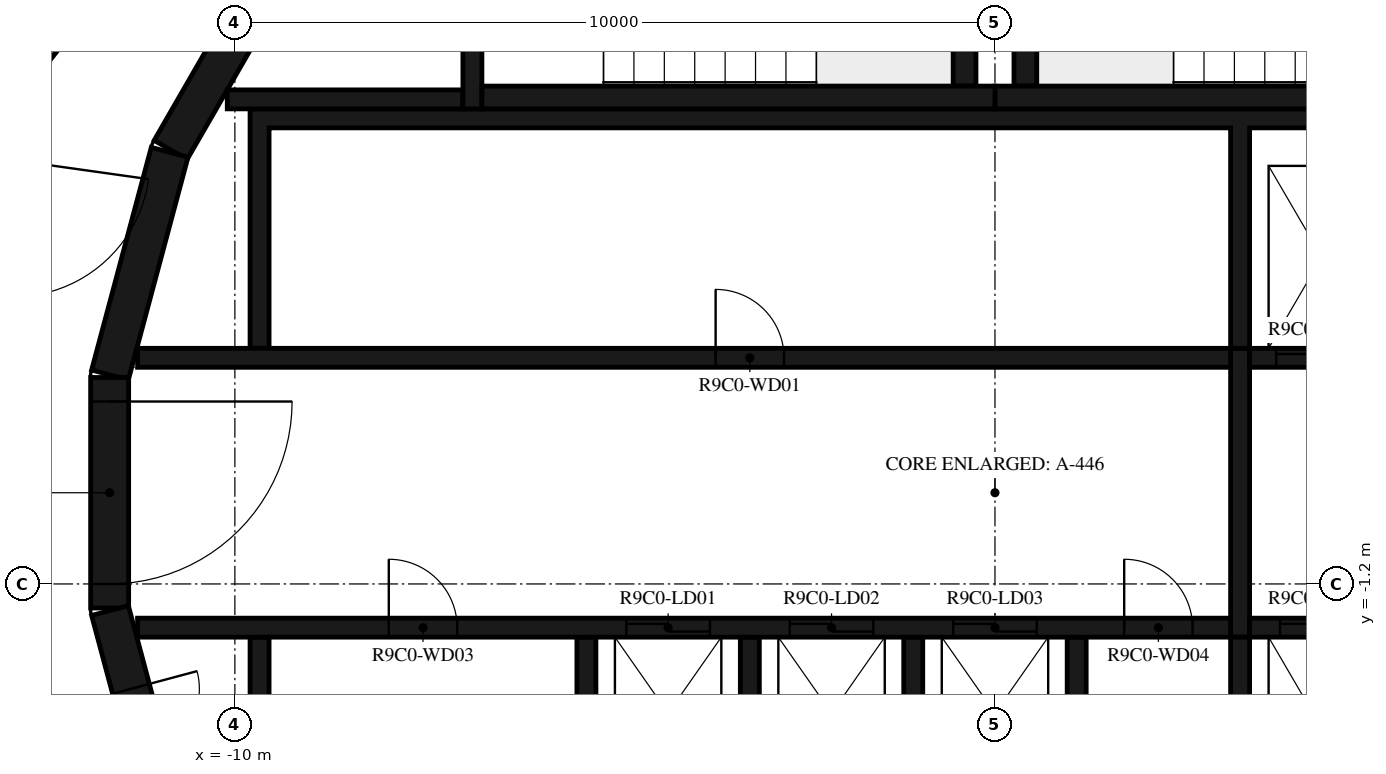
"""IFC4 building model, lengths in metres.
Left out: names, types, materials, properties, quantities, classifications, styles, units other than length and angle.
Written with IfcOpenShell. Run it as: python <this file> out.ifc"""

import sys

from ifc_helpers import new_model, si_unit, direction, frame, frame_2d, origin, place, context, subcontext, project, spatial, polyline, rectangle, outline, extrude, element, fill, save


model = new_model("IFC4")
c1 = context("Model", 3, precision=1e-05, world=origin(), true_north=direction((0.0, 1.0)))
c2 = subcontext(c1, "Body", "Model", "MODEL_VIEW")
j1 = project(units=[si_unit("LENGTHUNIT", "METRE"), si_unit("PLANEANGLEUNIT", "RADIAN")], contexts=[c1])
p1 = place(None, origin())
s1 = spatial("IfcSite", under=j1, at=p1, CompositionType="ELEMENT")
p2 = place(p1, origin())
s2 = spatial("IfcBuilding", under=s1, at=p2, CompositionType="ELEMENT")
p3 = place(p2, frame((0.0, 0.0, 354.0)))
s3 = spatial("IfcBuildingStorey", under=s2, at=p3, CompositionType="ELEMENT", Elevation=354.0)
for number, where, z_axis, x_axis in (
    (1, (-9.329, 7.137, 0.0), (0.0, 0.0, 1.0), (-0.5, -0.866, 0.0)),
    (2, (-10.858, 4.479, 0.0), (0.0, 0.0, 1.0), (-0.259, -0.966, 0.0)),
):
    element("IfcWall", number, at=place(p3, frame(where, z_axis=z_axis, x_axis=x_axis)), inside=s3, PredefinedType="SHEAR", context=c2, shape_type="SweptSolid", body=[
        extrude(rectangle(XDim=3.033, YDim=0.5, at=frame_2d((1.516, 0.0))), origin(), (0.0, 0.0, 1.0), 3.12),
    ])
p4 = place(p3, frame((-11.647, 1.516, 0.0), z_axis=(0.0, 0.0, 1.0), x_axis=(0.0, -1.0, 0.0)))
e3 = element("IfcWall", 3, at=p4, inside=s3, PredefinedType="SHEAR", context=c2, shape_type="SweptSolid", body=[
    extrude(rectangle(XDim=3.033, YDim=0.5, at=frame_2d((1.516, 0.0))), origin(), (0.0, 0.0, 1.0), 3.12),
])
p5 = place(p4, frame((0.316, 0.0, 0.0)))
e4 = element("IfcOpeningElement", 4, at=p5, cuts=e3, PredefinedType="OPENING", context=c2, shape_type="SweptSolid", body=[
    extrude(rectangle(XDim=2.4, YDim=2.1, at=frame_2d((1.2, 1.05))), frame((0.0, 0.26, 0.0), z_axis=(0.0, -1.0, 0.0), x_axis=(1.0, 0.0, 0.0)), (0.0, 0.0, 1.0), 0.52),
])
p6 = place(p3, frame((-11.643, -1.55, 0.0), z_axis=(0.0, 0.0, 1.0), x_axis=(0.258734743916, -0.965948410781, 0.0)))
e5 = element("IfcWall", 5, at=p6, inside=s3, PredefinedType="SHEAR", context=c2, shape_type="SweptSolid", body=[
    extrude(rectangle(XDim=3.033, YDim=0.5, at=frame_2d((1.516, 0.0))), origin(), (0.0, 0.0, 1.0), 3.12),
])
p7 = place(p6, frame((1.066, 0.0, 0.0)))
e6 = element("IfcOpeningElement", 6, at=p7, cuts=e5, PredefinedType="OPENING", context=c2, shape_type="SweptSolid", body=[
    extrude(rectangle(XDim=0.9, YDim=2.1, at=frame_2d((0.45, 1.05))), frame((0.0, 0.26, 0.0), z_axis=(0.0, -1.0, 0.0), x_axis=(1.0, 0.0, 0.0)), (0.0, 0.0, 1.0), 0.52),
])
p8 = place(p3, frame((0.0, 5.2, 0.0), z_axis=(0.0, 0.0, 1.0), x_axis=(1.0, 0.0, 0.0)))
e7 = element("IfcWall", 7, at=p8, inside=s3, PredefinedType="SHEAR", context=c2, shape_type="SweptSolid", body=[
    extrude(rectangle(XDim=6.75, YDim=0.3, at=frame_2d((3.375, 0.0))), origin(), (0.0, 0.0, 1.0), 3.12),
])
p9 = place(p3, frame((0.4, 5.35, 0.0), z_axis=(0.0, 0.0, 1.0), x_axis=(0.0, 1.0, 0.0)))
e8 = element("IfcWall", 8, at=p9, inside=s3, PredefinedType="SHEAR", context=c2, shape_type="SweptSolid", body=[
    extrude(rectangle(XDim=3.32, YDim=0.3, at=frame_2d((1.66, 0.0))), origin(), (0.0, 0.0, 1.0), 3.12),
])
p10 = place(p3, frame((-6.75, 5.2, 0.0), z_axis=(0.0, 0.0, 1.0), x_axis=(1.0, 0.0, 0.0)))
e9 = element("IfcWall", 9, at=p10, inside=s3, PredefinedType="SHEAR", context=c2, shape_type="SweptSolid", body=[
    extrude(rectangle(XDim=6.75, YDim=0.3, at=frame_2d((3.375, 0.0))), origin(), (0.0, 0.0, 1.0), 3.12),
])
p11 = place(p3, frame((-0.4, 5.35, 0.0), z_axis=(0.0, 0.0, 1.0), x_axis=(0.0, 1.0, 0.0)))
e10 = element("IfcWall", 10, at=p11, inside=s3, PredefinedType="SHEAR", context=c2, shape_type="SweptSolid", body=[
    extrude(rectangle(XDim=3.32, YDim=0.3, at=frame_2d((1.66, 0.0))), origin(), (0.0, 0.0, 1.0), 3.12),
])
p12 = place(p3, frame((-6.875, 8.97, 0.0), z_axis=(0.0, 0.0, 1.0), x_axis=(0.0, -1.0, 0.0)))
e11 = element("IfcWall", 11, at=p12, inside=s3, PredefinedType="SHEAR", context=c2, shape_type="SweptSolid", body=[
    extrude(rectangle(XDim=3.92, YDim=0.25, at=frame_2d((1.96, 0.0))), origin(), (0.0, 0.0, 1.0), 3.12),
])
p13 = place(p12, frame((1.61, 0.0, 0.0)))
e12 = element("IfcOpeningElement", 12, at=p13, cuts=e11, PredefinedType="OPENING", context=c2, shape_type="SweptSolid", body=[
    extrude(rectangle(XDim=1.2, YDim=2.1, at=frame_2d((0.6, 1.05))), frame((0.0, 0.135, 0.0), z_axis=(0.0, -1.0, 0.0), x_axis=(1.0, 0.0, 0.0)), (0.0, 0.0, 1.0), 0.27),
])
p14 = place(p3, frame((-7.0, 5.175, 0.0), z_axis=(0.0, 0.0, 1.0), x_axis=(-1.0, 0.0, 0.0)))
e13 = element("IfcWall", 13, at=p14, inside=s3, PredefinedType="SHEAR", context=c2, shape_type="SweptSolid", body=[
    extrude(rectangle(XDim=3.1, YDim=0.25, at=frame_2d((1.55, 0.0))), origin(), (0.0, 0.0, 1.0), 3.12),
])
p15 = place(p3, origin())
e14 = element("IfcWall", 14, at=p15, inside=s3, PredefinedType="SHEAR", context=c2, shape_type="SweptSolid", body=[
    extrude(outline(polyline([(-9.8, 1.9), (-9.55, 1.9), (-9.55, 4.8), (3.1, 4.8), (3.1, 1.9), (3.35, 1.9), (3.35, 4.8), (5.25, 4.8), (5.25, 1.9), (5.5, 1.9), (5.5, 4.8), (7.4, 4.8), (7.4, 1.9), (7.65, 1.9), (7.65, 4.8), (9.55, 4.8), (9.55, 1.9), (9.8, 1.9), (9.8, 4.8), (9.8, 5.05), (-9.8, 5.05), (-9.8, 4.8), (-9.8, 1.9)])), origin(), (0.0, 0.0, 1.0), 3.12),
])
p16 = place(p3, origin())
e15 = element("IfcWall", 15, at=p16, inside=s3, PredefinedType="SHEAR", context=c2, shape_type="SweptSolid", body=[
    extrude(outline(polyline([(9.8, -5.05), (9.8, -4.8), (9.8, -1.9), (9.55, -1.9), (9.55, -4.8), (7.65, -4.8), (7.65, -1.9), (7.4, -1.9), (7.4, -4.8), (5.5, -4.8), (5.5, -1.9), (5.25, -1.9), (5.25, -4.8), (3.35, -4.8), (3.35, -1.9), (3.1, -1.9), (3.1, -4.8), (1.2, -4.8), (1.2, -1.9), (0.95, -1.9), (0.95, -4.8), (-0.95, -4.8), (-0.95, -1.9), (-1.2, -1.9), (-1.2, -4.8), (-3.1, -4.8), (-3.1, -1.9), (-3.35, -1.9), (-3.35, -4.8), (-5.25, -4.8), (-5.25, -1.9), (-5.5, -1.9), (-5.5, -4.8), (-9.55, -4.8), (-9.55, -1.9), (-9.8, -1.9), (-9.8, -4.8), (-9.8, -5.05), (9.8, -5.05)])), origin(), (0.0, 0.0, 1.0), 3.12),
])
p17 = place(p3, frame((-11.28, 1.775, 0.0), z_axis=(0.0, 0.0, 1.0), x_axis=(1.0, 0.0, 0.0)))
e16 = element("IfcWall", 16, at=p17, inside=s3, PredefinedType="SHEAR", context=c2, shape_type="SweptSolid", body=[
    extrude(rectangle(XDim=14.38, YDim=0.25, at=frame_2d((7.19, 0.0))), origin(), (0.0, 0.0, 1.0), 3.12),
])
p18 = place(p17, frame((7.605, 0.0, 0.0)))
e17 = element("IfcOpeningElement", 17, at=p18, cuts=e16, PredefinedType="OPENING", context=c2, shape_type="SweptSolid", body=[
    extrude(rectangle(XDim=0.9, YDim=2.1, at=frame_2d((0.45, 1.05))), frame((0.0, 0.135, 0.0), z_axis=(0.0, -1.0, 0.0), x_axis=(1.0, 0.0, 0.0)), (0.0, 0.0, 1.0), 0.27),
])
p19 = place(p3, frame((3.35, 1.775, 0.0), z_axis=(0.0, 0.0, 1.0), x_axis=(1.0, 0.0, 0.0)))
e18 = element("IfcWall", 18, at=p19, inside=s3, PredefinedType="SHEAR", context=c2, shape_type="SweptSolid", body=[
    extrude(rectangle(XDim=7.93, YDim=0.25, at=frame_2d((3.965, 0.0))), origin(), (0.0, 0.0, 1.0), 3.12),
])
p20 = place(p19, frame((0.35, 0.0, 0.0)))
e19 = element("IfcOpeningElement", 19, at=p20, cuts=e18, PredefinedType="OPENING", context=c2, shape_type="SweptSolid", body=[
    extrude(rectangle(XDim=1.2, YDim=2.4, at=frame_2d((0.6, 1.2))), frame((0.0, 0.135, 0.0), z_axis=(0.0, -1.0, 0.0), x_axis=(1.0, 0.0, 0.0)), (0.0, 0.0, 1.0), 0.27),
])
p21 = place(p19, frame((2.5, 0.0, 0.0)))
e20 = element("IfcOpeningElement", 20, at=p21, cuts=e18, PredefinedType="OPENING", context=c2, shape_type="SweptSolid", body=[
    extrude(rectangle(XDim=1.2, YDim=2.4, at=frame_2d((0.6, 1.2))), frame((0.0, 0.135, 0.0), z_axis=(0.0, -1.0, 0.0), x_axis=(1.0, 0.0, 0.0)), (0.0, 0.0, 1.0), 0.27),
])
p22 = place(p19, frame((4.8, 0.0, 0.0)))
e21 = element("IfcOpeningElement", 21, at=p22, cuts=e18, PredefinedType="OPENING", context=c2, shape_type="SweptSolid", body=[
    extrude(rectangle(XDim=0.9, YDim=2.1, at=frame_2d((0.45, 1.05))), frame((0.0, 0.135, 0.0), z_axis=(0.0, -1.0, 0.0), x_axis=(1.0, 0.0, 0.0)), (0.0, 0.0, 1.0), 0.27),
])
p23 = place(p3, frame((-11.28, -1.775, 0.0), z_axis=(0.0, 0.0, 1.0), x_axis=(1.0, 0.0, 0.0)))
e22 = element("IfcWall", 22, at=p23, inside=s3, PredefinedType="SHEAR", context=c2, shape_type="SweptSolid", body=[
    extrude(rectangle(XDim=14.38, YDim=0.25, at=frame_2d((7.19, 0.0))), origin(), (0.0, 0.0, 1.0), 3.12),
])
p24 = place(p23, frame((6.43, 0.0, 0.0)))
e23 = element("IfcOpeningElement", 23, at=p24, cuts=e22, PredefinedType="OPENING", context=c2, shape_type="SweptSolid", body=[
    extrude(rectangle(XDim=1.1, YDim=2.1, at=frame_2d((0.55, 1.05))), frame((0.0, 0.135, 0.0), z_axis=(0.0, -1.0, 0.0), x_axis=(1.0, 0.0, 0.0)), (0.0, 0.0, 1.0), 0.27),
])
p25 = place(p23, frame((8.58, 0.0, 0.0)))
e24 = element("IfcOpeningElement", 24, at=p25, cuts=e22, PredefinedType="OPENING", context=c2, shape_type="SweptSolid", body=[
    extrude(rectangle(XDim=1.1, YDim=2.1, at=frame_2d((0.55, 1.05))), frame((0.0, 0.135, 0.0), z_axis=(0.0, -1.0, 0.0), x_axis=(1.0, 0.0, 0.0)), (0.0, 0.0, 1.0), 0.27),
])
p26 = place(p23, frame((10.73, 0.0, 0.0)))
e25 = element("IfcOpeningElement", 25, at=p26, cuts=e22, PredefinedType="OPENING", context=c2, shape_type="SweptSolid", body=[
    extrude(rectangle(XDim=1.1, YDim=2.1, at=frame_2d((0.55, 1.05))), frame((0.0, 0.135, 0.0), z_axis=(0.0, -1.0, 0.0), x_axis=(1.0, 0.0, 0.0)), (0.0, 0.0, 1.0), 0.27),
])
p27 = place(p23, frame((3.305, 0.0, 0.0)))
e26 = element("IfcOpeningElement", 26, at=p27, cuts=e22, PredefinedType="OPENING", context=c2, shape_type="SweptSolid", body=[
    extrude(rectangle(XDim=0.9, YDim=2.1, at=frame_2d((0.45, 1.05))), frame((0.0, 0.135, 0.0), z_axis=(0.0, -1.0, 0.0), x_axis=(1.0, 0.0, 0.0)), (0.0, 0.0, 1.0), 0.27),
])
p28 = place(p23, frame((12.98, 0.0, 0.0)))
e27 = element("IfcOpeningElement", 27, at=p28, cuts=e22, PredefinedType="OPENING", context=c2, shape_type="SweptSolid", body=[
    extrude(rectangle(XDim=0.9, YDim=2.1, at=frame_2d((0.45, 1.05))), frame((0.0, 0.135, 0.0), z_axis=(0.0, -1.0, 0.0), x_axis=(1.0, 0.0, 0.0)), (0.0, 0.0, 1.0), 0.27),
])
p29 = place(p3, frame((3.35, -1.775, 0.0), z_axis=(0.0, 0.0, 1.0), x_axis=(1.0, 0.0, 0.0)))
e28 = element("IfcWall", 28, at=p29, inside=s3, PredefinedType="SHEAR", context=c2, shape_type="SweptSolid", body=[
    extrude(rectangle(XDim=7.93, YDim=0.25, at=frame_2d((3.965, 0.0))), origin(), (0.0, 0.0, 1.0), 3.12),
])
p30 = place(p29, frame((0.4, 0.0, 0.0)))
e29 = element("IfcOpeningElement", 29, at=p30, cuts=e28, PredefinedType="OPENING", context=c2, shape_type="SweptSolid", body=[
    extrude(rectangle(XDim=1.1, YDim=2.4, at=frame_2d((0.55, 1.2))), frame((0.0, 0.135, 0.0), z_axis=(0.0, -1.0, 0.0), x_axis=(1.0, 0.0, 0.0)), (0.0, 0.0, 1.0), 0.27),
])
p31 = place(p29, frame((2.55, 0.0, 0.0)))
e30 = element("IfcOpeningElement", 30, at=p31, cuts=e28, PredefinedType="OPENING", context=c2, shape_type="SweptSolid", body=[
    extrude(rectangle(XDim=1.1, YDim=2.4, at=frame_2d((0.55, 1.2))), frame((0.0, 0.135, 0.0), z_axis=(0.0, -1.0, 0.0), x_axis=(1.0, 0.0, 0.0)), (0.0, 0.0, 1.0), 0.27),
])
p32 = place(p29, frame((4.7, 0.0, 0.0)))
e31 = element("IfcOpeningElement", 31, at=p32, cuts=e28, PredefinedType="OPENING", context=c2, shape_type="SweptSolid", body=[
    extrude(rectangle(XDim=1.1, YDim=2.4, at=frame_2d((0.55, 1.2))), frame((0.0, 0.135, 0.0), z_axis=(0.0, -1.0, 0.0), x_axis=(1.0, 0.0, 0.0)), (0.0, 0.0, 1.0), 0.27),
])
p33 = place(p3, frame((3.225, -1.9, 0.0), z_axis=(0.0, 0.0, 1.0), x_axis=(0.0, 1.0, 0.0)))
e32 = element("IfcWall", 32, at=p33, inside=s3, PredefinedType="SHEAR", context=c2, shape_type="SweptSolid", body=[
    extrude(rectangle(XDim=3.8, YDim=0.25, at=frame_2d((1.9, 0.0))), origin(), (0.0, 0.0, 1.0), 3.12),
])
p34 = place(p3, frame((-13.769, -1.691, 0.0), z_axis=(0.0, 0.0, 1.0), x_axis=(0.372720094028, -0.927943819155, 0.0)))
e33 = element("IfcWall", 33, at=p34, inside=s3, PredefinedType="STANDARD", context=c2, shape_type="SweptSolid", body=[
    extrude(rectangle(XDim=4.875, YDim=0.2, at=frame_2d((2.438, 0.0))), origin(), (0.0, 0.0, 1.0), 3.12),
])
p35 = place(p3, frame((-8.349, 11.079, 0.0), z_axis=(0.0, 0.0, 1.0), x_axis=(-0.615669112324, -0.78800478687, 0.0)))
e34 = element("IfcWall", 34, at=p35, inside=s3, PredefinedType="STANDARD", context=c2, shape_type="SweptSolid", body=[
    extrude(rectangle(XDim=7.181, YDim=0.2, at=frame_2d((3.591, 0.0))), origin(), (0.0, 0.0, 1.0), 3.12),
])
p36 = place(p35, frame((2.1, 0.0, 0.0)))
e35 = element("IfcOpeningElement", 35, at=p36, cuts=e34, PredefinedType="OPENING", context=c2, shape_type="SweptSolid", body=[
    extrude(rectangle(XDim=1.0, YDim=2.1, at=frame_2d((0.5, 1.05))), frame((0.0, 0.11, 0.0), z_axis=(0.0, -1.0, 0.0), x_axis=(1.0, 0.0, 0.0)), (0.0, 0.0, 1.0), 0.22),
])
p37 = place(p35, frame((3.79, 0.0, 0.0)))
e36 = element("IfcOpeningElement", 36, at=p37, cuts=e34, PredefinedType="OPENING", context=c2, shape_type="SweptSolid", body=[
    extrude(rectangle(XDim=1.0, YDim=2.1, at=frame_2d((0.5, 1.05))), frame((0.0, 0.11, 0.0), z_axis=(0.0, -1.0, 0.0), x_axis=(1.0, 0.0, 0.0)), (0.0, 0.0, 1.0), 0.22),
])
p38 = place(p5, origin())
e37 = element("IfcDoor", 37, at=p38, inside=s3, OperationType="DOUBLE_DOOR_SINGLE_SWING", PredefinedType="DOOR", context=c2, shape_type="SweptSolid", body=[
    extrude(rectangle(XDim=2.4, YDim=2.1, at=frame_2d((1.2, 1.05))), frame((0.0, 0.025, 0.0), z_axis=(0.0, -1.0, 0.0), x_axis=(1.0, 0.0, 0.0)), (0.0, 0.0, 1.0), 0.05),
])
fill(e4, e37)
p39 = place(p20, origin())
e38 = element("IfcDoor", 38, at=p39, inside=s3, OperationType="DOUBLE_DOOR_SLIDING", PredefinedType="DOOR", context=c2, shape_type="SweptSolid", body=[
    extrude(rectangle(XDim=1.2, YDim=2.4, at=frame_2d((0.6, 1.2))), frame((0.0, 0.025, 0.0), z_axis=(0.0, -1.0, 0.0), x_axis=(1.0, 0.0, 0.0)), (0.0, 0.0, 1.0), 0.05),
])
fill(e19, e38)
p40 = place(p24, origin())
e39 = element("IfcDoor", 39, at=p40, inside=s3, OperationType="DOUBLE_DOOR_SLIDING", PredefinedType="DOOR", context=c2, shape_type="SweptSolid", body=[
    extrude(rectangle(XDim=1.1, YDim=2.1, at=frame_2d((0.55, 1.05))), frame((0.0, 0.025, 0.0), z_axis=(0.0, -1.0, 0.0), x_axis=(1.0, 0.0, 0.0)), (0.0, 0.0, 1.0), 0.05),
])
fill(e23, e39)
p41 = place(p25, origin())
e40 = element("IfcDoor", 40, at=p41, inside=s3, OperationType="DOUBLE_DOOR_SLIDING", PredefinedType="DOOR", context=c2, shape_type="SweptSolid", body=[
    extrude(rectangle(XDim=1.1, YDim=2.1, at=frame_2d((0.55, 1.05))), frame((0.0, 0.025, 0.0), z_axis=(0.0, -1.0, 0.0), x_axis=(1.0, 0.0, 0.0)), (0.0, 0.0, 1.0), 0.05),
])
fill(e24, e40)
p42 = place(p26, origin())
e41 = element("IfcDoor", 41, at=p42, inside=s3, OperationType="DOUBLE_DOOR_SLIDING", PredefinedType="DOOR", context=c2, shape_type="SweptSolid", body=[
    extrude(rectangle(XDim=1.1, YDim=2.1, at=frame_2d((0.55, 1.05))), frame((0.0, 0.025, 0.0), z_axis=(0.0, -1.0, 0.0), x_axis=(1.0, 0.0, 0.0)), (0.0, 0.0, 1.0), 0.05),
])
fill(e25, e41)
p43 = place(p30, origin())
e42 = element("IfcDoor", 42, at=p43, inside=s3, OperationType="DOUBLE_DOOR_SLIDING", PredefinedType="DOOR", context=c2, shape_type="SweptSolid", body=[
    extrude(rectangle(XDim=1.1, YDim=2.4, at=frame_2d((0.55, 1.2))), frame((0.0, 0.025, 0.0), z_axis=(0.0, -1.0, 0.0), x_axis=(1.0, 0.0, 0.0)), (0.0, 0.0, 1.0), 0.05),
])
fill(e29, e42)
p44 = place(p18, origin())
e43 = element("IfcDoor", 43, at=p44, inside=s3, OperationType="SINGLE_SWING_LEFT", PredefinedType="DOOR", context=c2, shape_type="SweptSolid", body=[
    extrude(rectangle(XDim=0.9, YDim=2.1, at=frame_2d((0.45, 1.05))), frame((0.0, 0.025, 0.0), z_axis=(0.0, -1.0, 0.0), x_axis=(1.0, 0.0, 0.0)), (0.0, 0.0, 1.0), 0.05),
])
fill(e17, e43)
p45 = place(p27, origin())
e44 = element("IfcDoor", 44, at=p45, inside=s3, OperationType="SINGLE_SWING_LEFT", PredefinedType="DOOR", context=c2, shape_type="SweptSolid", body=[
    extrude(rectangle(XDim=0.9, YDim=2.1, at=frame_2d((0.45, 1.05))), frame((0.0, 0.025, 0.0), z_axis=(0.0, -1.0, 0.0), x_axis=(1.0, 0.0, 0.0)), (0.0, 0.0, 1.0), 0.05),
])
fill(e26, e44)
p46 = place(p28, origin())
e45 = element("IfcDoor", 45, at=p46, inside=s3, OperationType="SINGLE_SWING_RIGHT", PredefinedType="DOOR", context=c2, shape_type="SweptSolid", body=[
    extrude(rectangle(XDim=0.9, YDim=2.1, at=frame_2d((0.45, 1.05))), frame((0.0, 0.025, 0.0), z_axis=(0.0, -1.0, 0.0), x_axis=(1.0, 0.0, 0.0)), (0.0, 0.0, 1.0), 0.05),
])
fill(e27, e45)
p47 = place(p7, origin())
e46 = element("IfcDoor", 46, at=p47, inside=s3, OperationType="SINGLE_SWING_LEFT", PredefinedType="DOOR", context=c2, shape_type="SweptSolid", body=[
    extrude(rectangle(XDim=0.9, YDim=2.1, at=frame_2d((0.45, 1.05))), frame((0.0, 0.025, 0.0), z_axis=(0.0, -1.0, 0.0), x_axis=(1.0, 0.0, 0.0)), (0.0, 0.0, 1.0), 0.05),
])
fill(e6, e46)
save(model, sys.argv[1])
